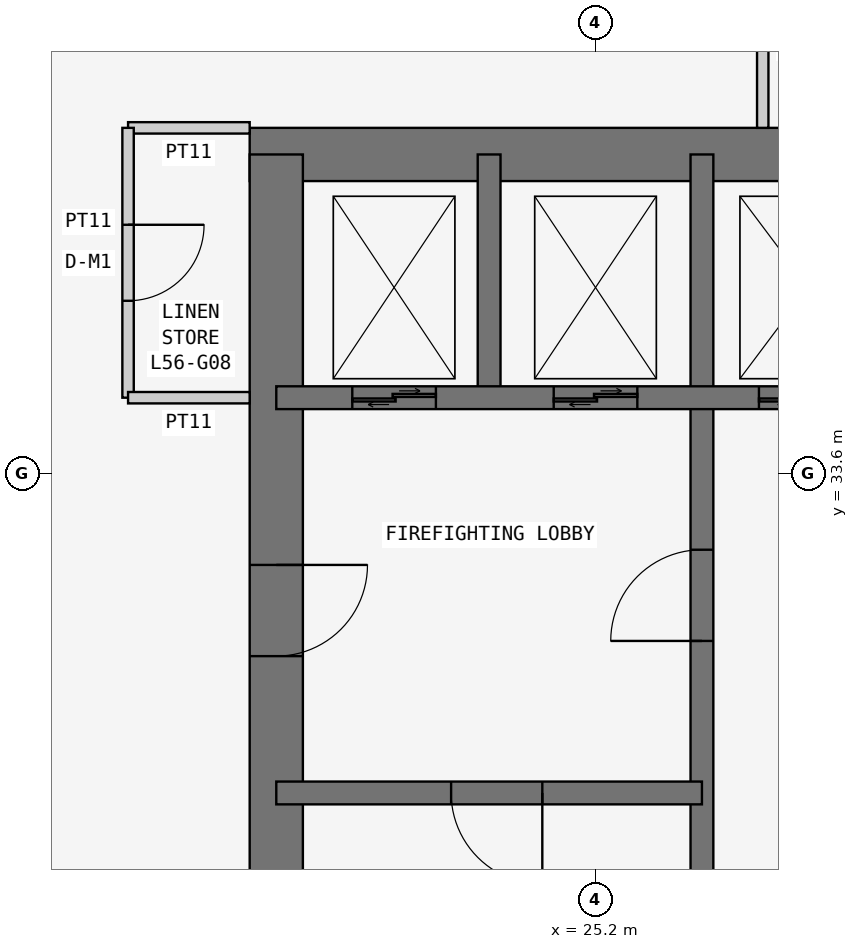
"""IFC4 building model, lengths in metres.
Left out: names, types, materials, properties, quantities, classifications, styles, units other than length and angle.
Written with IfcOpenShell. Run it as: python <this file> out.ifc"""

import sys

from ifc_helpers import new_model, si_unit, direction, frame, frame_2d, origin, place, context, subcontext, project, spatial, rectangle, extrude, element, fill, save


model = new_model("IFC4")
c1 = context("Model", 3, precision=1e-05, world=origin(), true_north=direction((0.0, 1.0)))
c2 = subcontext(c1, "Body", "Model", "MODEL_VIEW")
j1 = project(units=[si_unit("LENGTHUNIT", "METRE"), si_unit("PLANEANGLEUNIT", "RADIAN")], contexts=[c1])
p1 = place(None, origin())
s1 = spatial("IfcSite", under=j1, at=p1, CompositionType="ELEMENT")
p2 = place(p1, origin())
s2 = spatial("IfcBuilding", under=s1, at=p2, CompositionType="ELEMENT")
p3 = place(p2, frame((0.0, 0.0, 215.7)))
s3 = spatial("IfcBuildingStorey", under=s2, at=p3, CompositionType="ELEMENT", Elevation=215.7)
p4 = place(p3, frame((37.8, 37.8, 0.0), z_axis=(0.0, 0.0, 1.0), x_axis=(-1.0, 0.0, 0.0)))
e1 = element("IfcWall", 1, at=p4, inside=s3, PredefinedType="SHEAR", context=c2, shape_type="SweptSolid", body=[
    extrude(rectangle(XDim=17.15, YDim=0.7, at=frame_2d((8.575, 0.0))), origin(), (0.0, 0.0, 1.0), 3.6),
])
p5 = place(p3, frame((21.0, 37.8, 0.0), z_axis=(0.0, 0.0, 1.0), x_axis=(0.0, -1.0, 0.0)))
e2 = element("IfcWall", 2, at=p5, inside=s3, PredefinedType="SHEAR", context=c2, shape_type="SweptSolid", body=[
    extrude(rectangle(XDim=17.15, YDim=0.7, at=frame_2d((8.575, 0.0))), origin(), (0.0, 0.0, 1.0), 3.6),
])
p6 = place(p5, frame((5.4, 0.0, 0.0)))
e3 = element("IfcOpeningElement", 3, at=p6, cuts=e2, PredefinedType="OPENING", context=c2, shape_type="SweptSolid", body=[
    extrude(rectangle(XDim=1.2, YDim=2.1, at=frame_2d((0.6, 1.05))), frame((0.0, 0.36, 0.0), z_axis=(0.0, -1.0, 0.0), x_axis=(1.0, 0.0, 0.0)), (0.0, 0.0, 1.0), 0.72),
])
p7 = place(p3, frame((26.6, 21.0, 0.0), z_axis=(0.0, 0.0, 1.0), x_axis=(0.0, 1.0, 0.0)))
e4 = element("IfcWall", 4, at=p7, inside=s3, PredefinedType="SHEAR", context=c2, shape_type="SweptSolid", body=[
    extrude(rectangle(XDim=16.8, YDim=0.3, at=frame_2d((8.4, 0.0))), origin(), (0.0, 0.0, 1.0), 3.6),
])
p8 = place(p7, frame((10.4, 0.0, 0.0)))
e5 = element("IfcOpeningElement", 5, at=p8, cuts=e4, PredefinedType="OPENING", context=c2, shape_type="SweptSolid", body=[
    extrude(rectangle(XDim=1.2, YDim=2.1, at=frame_2d((0.6, 1.05))), frame((0.0, 0.16, 0.0), z_axis=(0.0, -1.0, 0.0), x_axis=(1.0, 0.0, 0.0)), (0.0, 0.0, 1.0), 0.32),
])
p9 = place(p3, frame((21.0, 29.4, 0.0), z_axis=(0.0, 0.0, 1.0), x_axis=(1.0, 0.0, 0.0)))
e6 = element("IfcWall", 6, at=p9, inside=s3, PredefinedType="SHEAR", context=c2, shape_type="SweptSolid", body=[
    extrude(rectangle(XDim=5.6, YDim=0.3, at=frame_2d((2.8, 0.0))), origin(), (0.0, 0.0, 1.0), 3.6),
])
p10 = place(p9, frame((2.3, 0.0, 0.0)))
e7 = element("IfcOpeningElement", 7, at=p10, cuts=e6, PredefinedType="OPENING", context=c2, shape_type="SweptSolid", body=[
    extrude(rectangle(XDim=1.2, YDim=2.1, at=frame_2d((0.6, 1.05))), frame((0.0, 0.16, 0.0), z_axis=(0.0, -1.0, 0.0), x_axis=(1.0, 0.0, 0.0)), (0.0, 0.0, 1.0), 0.32),
])
p11 = place(p3, frame((21.0, 34.6, 0.0), z_axis=(0.0, 0.0, 1.0), x_axis=(1.0, 0.0, 0.0)))
e8 = element("IfcWall", 8, at=p11, inside=s3, PredefinedType="SHEAR", context=c2, shape_type="SweptSolid", body=[
    extrude(rectangle(XDim=11.2, YDim=0.3, at=frame_2d((5.6, 0.0))), origin(), (0.0, 0.0, 1.0), 3.6),
])
p12 = place(p11, frame((9.25, 0.0, 0.0)))
e9 = element("IfcOpeningElement", 9, at=p12, cuts=e8, PredefinedType="OPENING", context=c2, shape_type="SweptSolid", body=[
    extrude(rectangle(XDim=1.1, YDim=2.1, at=frame_2d((0.55, 1.05))), frame((0.0, 0.16, 0.0), z_axis=(0.0, -1.0, 0.0), x_axis=(1.0, 0.0, 0.0)), (0.0, 0.0, 1.0), 0.32),
])
p13 = place(p11, frame((1.0, 0.0, 0.0)))
e10 = element("IfcOpeningElement", 10, at=p13, cuts=e8, PredefinedType="OPENING", context=c2, shape_type="SweptSolid", body=[
    extrude(rectangle(XDim=1.1, YDim=2.1, at=frame_2d((0.55, 1.05))), frame((0.0, 0.16, 0.0), z_axis=(0.0, -1.0, 0.0), x_axis=(1.0, 0.0, 0.0)), (0.0, 0.0, 1.0), 0.32),
])
p14 = place(p11, frame((3.65, 0.0, 0.0)))
e11 = element("IfcOpeningElement", 11, at=p14, cuts=e8, PredefinedType="OPENING", context=c2, shape_type="SweptSolid", body=[
    extrude(rectangle(XDim=1.1, YDim=2.1, at=frame_2d((0.55, 1.05))), frame((0.0, 0.16, 0.0), z_axis=(0.0, -1.0, 0.0), x_axis=(1.0, 0.0, 0.0)), (0.0, 0.0, 1.0), 0.32),
])
p15 = place(p11, frame((6.35, 0.0, 0.0)))
e12 = element("IfcOpeningElement", 12, at=p15, cuts=e8, PredefinedType="OPENING", context=c2, shape_type="SweptSolid", body=[
    extrude(rectangle(XDim=1.3, YDim=2.1, at=frame_2d((0.65, 1.05))), frame((0.0, 0.16, 0.0), z_axis=(0.0, -1.0, 0.0), x_axis=(1.0, 0.0, 0.0)), (0.0, 0.0, 1.0), 0.32),
])
p16 = place(p3, frame((23.8, 34.6, 0.0), z_axis=(0.0, 0.0, 1.0), x_axis=(0.0, 1.0, 0.0)))
e13 = element("IfcWall", 13, at=p16, inside=s3, PredefinedType="SHEAR", context=c2, shape_type="SweptSolid", body=[
    extrude(rectangle(XDim=3.2, YDim=0.3, at=frame_2d((1.6, 0.0))), origin(), (0.0, 0.0, 1.0), 3.6),
])
p17 = place(p3, frame((27.4, 40.25, 0.0), z_axis=(0.0, 0.0, 1.0), x_axis=(0.0, -1.0, 0.0)))
e14 = element("IfcWall", 14, at=p17, inside=s3, PredefinedType="PARTITIONING", context=c2, shape_type="SweptSolid", body=[
    extrude(rectangle(XDim=2.1, YDim=0.15, at=frame_2d((1.05, 0.0))), origin(), (0.0, 0.0, 1.0), 3.45),
])
p18 = place(p3, frame((20.65, 38.15, 0.0), z_axis=(0.0, 0.0, 1.0), x_axis=(-1.0, 0.0, 0.0)))
e15 = element("IfcWall", 15, at=p18, inside=s3, PredefinedType="PARTITIONING", context=c2, shape_type="SweptSolid", body=[
    extrude(rectangle(XDim=1.6, YDim=0.15, at=frame_2d((0.8, 0.0))), origin(), (0.0, 0.0, 1.0), 3.45),
])
p19 = place(p3, frame((19.05, 38.15, 0.0), z_axis=(0.0, 0.0, 1.0), x_axis=(0.0, -1.0, 0.0)))
e16 = element("IfcWall", 16, at=p19, inside=s3, PredefinedType="PARTITIONING", context=c2, shape_type="SweptSolid", body=[
    extrude(rectangle(XDim=3.55, YDim=0.15, at=frame_2d((1.775, 0.0))), origin(), (0.0, 0.0, 1.0), 3.45),
])
p20 = place(p19, frame((1.275, 0.0, 0.0)))
e17 = element("IfcOpeningElement", 17, at=p20, cuts=e16, PredefinedType="OPENING", context=c2, shape_type="SweptSolid", body=[
    extrude(rectangle(XDim=1.0, YDim=2.1, at=frame_2d((0.5, 1.05))), frame((0.0, 0.085, 0.0), z_axis=(0.0, -1.0, 0.0), x_axis=(1.0, 0.0, 0.0)), (0.0, 0.0, 1.0), 0.17),
])
p21 = place(p3, frame((19.05, 34.6, 0.0), z_axis=(0.0, 0.0, 1.0), x_axis=(1.0, 0.0, 0.0)))
e18 = element("IfcWall", 18, at=p21, inside=s3, PredefinedType="PARTITIONING", context=c2, shape_type="SweptSolid", body=[
    extrude(rectangle(XDim=1.6, YDim=0.15, at=frame_2d((0.8, 0.0))), origin(), (0.0, 0.0, 1.0), 3.45),
])
p22 = place(p20, origin())
e19 = element("IfcDoor", 19, at=p22, inside=s3, OperationType="SINGLE_SWING_LEFT", PredefinedType="DOOR", context=c2, shape_type="SweptSolid", body=[
    extrude(rectangle(XDim=1.0, YDim=2.1, at=frame_2d((0.5, 1.05))), frame((0.0, 0.025, 0.0), z_axis=(0.0, -1.0, 0.0), x_axis=(1.0, 0.0, 0.0)), (0.0, 0.0, 1.0), 0.05),
])
fill(e17, e19)
p23 = place(p6, origin())
e20 = element("IfcDoor", 20, at=p23, inside=s3, OperationType="SINGLE_SWING_LEFT", PredefinedType="DOOR", context=c2, shape_type="SweptSolid", body=[
    extrude(rectangle(XDim=1.2, YDim=2.1, at=frame_2d((0.6, 1.05))), frame((0.0, 0.025, 0.0), z_axis=(0.0, -1.0, 0.0), x_axis=(1.0, 0.0, 0.0)), (0.0, 0.0, 1.0), 0.05),
])
fill(e3, e20)
p24 = place(p10, frame((1.2, 0.0, 0.0), z_axis=(0.0, 0.0, 1.0), x_axis=(-1.0, 0.0, 0.0)))
e21 = element("IfcDoor", 21, at=p24, inside=s3, OperationType="SINGLE_SWING_LEFT", PredefinedType="DOOR", context=c2, shape_type="SweptSolid", body=[
    extrude(rectangle(XDim=1.2, YDim=2.1, at=frame_2d((0.6, 1.05))), frame((0.0, 0.025, 0.0), z_axis=(0.0, -1.0, 0.0), x_axis=(1.0, 0.0, 0.0)), (0.0, 0.0, 1.0), 0.05),
])
fill(e7, e21)
p25 = place(p8, origin())
e22 = element("IfcDoor", 22, at=p25, inside=s3, OperationType="SINGLE_SWING_LEFT", PredefinedType="DOOR", context=c2, shape_type="SweptSolid", body=[
    extrude(rectangle(XDim=1.2, YDim=2.1, at=frame_2d((0.6, 1.05))), frame((0.0, 0.025, 0.0), z_axis=(0.0, -1.0, 0.0), x_axis=(1.0, 0.0, 0.0)), (0.0, 0.0, 1.0), 0.05),
])
fill(e5, e22)
p26 = place(p13, origin())
e23 = element("IfcDoor", 23, at=p26, inside=s3, OperationType="DOUBLE_DOOR_SLIDING", PredefinedType="DOOR", context=c2, shape_type="SweptSolid", body=[
    extrude(rectangle(XDim=1.1, YDim=2.1, at=frame_2d((0.55, 1.05))), frame((0.0, 0.025, 0.0), z_axis=(0.0, -1.0, 0.0), x_axis=(1.0, 0.0, 0.0)), (0.0, 0.0, 1.0), 0.05),
])
fill(e10, e23)
p27 = place(p14, origin())
e24 = element("IfcDoor", 24, at=p27, inside=s3, OperationType="DOUBLE_DOOR_SLIDING", PredefinedType="DOOR", context=c2, shape_type="SweptSolid", body=[
    extrude(rectangle(XDim=1.1, YDim=2.1, at=frame_2d((0.55, 1.05))), frame((0.0, 0.025, 0.0), z_axis=(0.0, -1.0, 0.0), x_axis=(1.0, 0.0, 0.0)), (0.0, 0.0, 1.0), 0.05),
])
fill(e11, e24)
p28 = place(p15, origin())
e25 = element("IfcDoor", 25, at=p28, inside=s3, OperationType="DOUBLE_DOOR_SLIDING", PredefinedType="DOOR", context=c2, shape_type="SweptSolid", body=[
    extrude(rectangle(XDim=1.3, YDim=2.1, at=frame_2d((0.65, 1.05))), frame((0.0, 0.025, 0.0), z_axis=(0.0, -1.0, 0.0), x_axis=(1.0, 0.0, 0.0)), (0.0, 0.0, 1.0), 0.05),
])
fill(e12, e25)
save(model, sys.argv[1])
